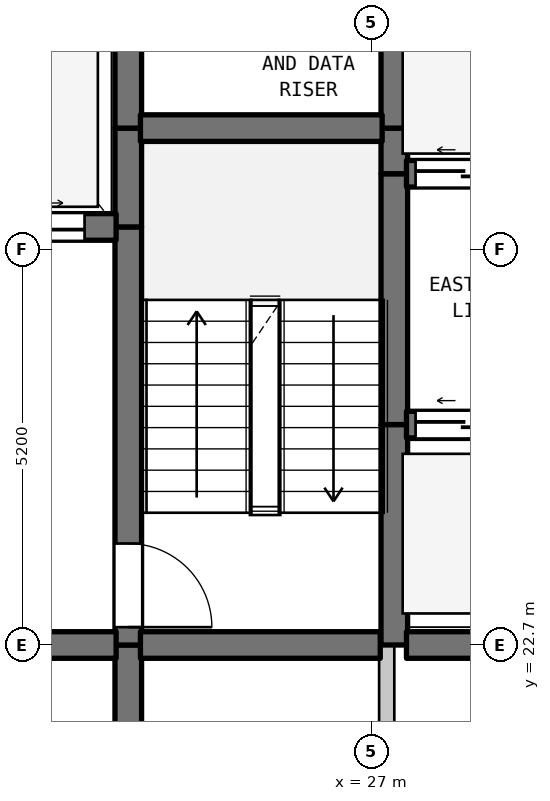
"""IFC4 building model, lengths in metres.
Left out: names, types, materials, properties, quantities, classifications, styles, units other than length and angle.
Written with IfcOpenShell. Run it as: python <this file> out.ifc"""

import sys

from ifc_helpers import new_model, si_unit, direction, frame, frame_2d, origin, place, context, subcontext, project, spatial, rectangle, extrude, element, fill, save


model = new_model("IFC4")
c1 = context("Model", 3, precision=1e-05, world=origin(), true_north=direction((0.0, 1.0)))
c2 = subcontext(c1, "Body", "Model", "MODEL_VIEW")
j1 = project(units=[si_unit("LENGTHUNIT", "METRE"), si_unit("PLANEANGLEUNIT", "RADIAN")], contexts=[c1])
p1 = place(None, origin())
s1 = spatial("IfcSite", under=j1, at=p1, CompositionType="ELEMENT")
p2 = place(p1, origin())
s2 = spatial("IfcBuilding", under=s1, at=p2, CompositionType="ELEMENT")
p3 = place(p2, frame((0.0, 0.0, 42.5)))
s3 = spatial("IfcBuildingStorey", under=s2, at=p3, CompositionType="ELEMENT", Elevation=42.5)
p4 = place(p3, frame((23.8, 19.5, 0.0), z_axis=(0.0, 0.0, 1.0), x_axis=(0.0, 1.0, 0.0)))
e1 = element("IfcWall", 1, at=p4, inside=s3, PredefinedType="SHEAR", context=c2, shape_type="SweptSolid", body=[
    extrude(rectangle(XDim=3.2, YDim=0.35, at=frame_2d((1.6, 0.0))), origin(), (0.0, 0.0, 1.0), 3.385),
])
p5 = place(p3, frame((23.8, 22.7, 0.0), z_axis=(0.0, 0.0, 1.0), x_axis=(0.0, 1.0, 0.0)))
e2 = element("IfcWall", 2, at=p5, inside=s3, PredefinedType="SHEAR", context=c2, shape_type="SweptSolid", body=[
    extrude(rectangle(XDim=5.5, YDim=0.35, at=frame_2d((2.75, 0.0))), origin(), (0.0, 0.0, 1.0), 3.385),
])
p6 = place(p5, frame((0.235, 0.0, 0.0)))
e3 = element("IfcOpeningElement", 3, at=p6, cuts=e2, PredefinedType="OPENING", context=c2, shape_type="SweptSolid", body=[
    extrude(rectangle(XDim=1.1, YDim=2.15, at=frame_2d((0.55, 1.075))), frame((0.0, 0.185, 0.0), z_axis=(0.0, -1.0, 0.0), x_axis=(1.0, 0.0, 0.0)), (0.0, 0.0, 1.0), 0.37),
])
for number, where, z_axis, x_axis in (
    (4, (23.8, 28.2, 0.0), (0.0, 0.0, 1.0), (0.0, 1.0, 0.0)),
    (5, (23.8, 29.5, 0.0), (0.0, 0.0, 1.0), (0.0, 1.0, 0.0)),
):
    element("IfcWall", number, at=place(p3, frame(where, z_axis=z_axis, x_axis=x_axis)), inside=s3, PredefinedType="SHEAR", context=c2, shape_type="SweptSolid", body=[
        extrude(rectangle(XDim=1.3, YDim=0.35, at=frame_2d((0.65, 0.0))), origin(), (0.0, 0.0, 1.0), 3.385),
    ])
p7 = place(p3, frame((27.2, 21.1, 0.0), z_axis=(0.0, 0.0, 1.0), x_axis=(0.0, 1.0, 0.0)))
e6 = element("IfcWall", 6, at=p7, inside=s3, PredefinedType="STANDARD", context=c2, shape_type="SweptSolid", body=[
    extrude(rectangle(XDim=1.6, YDim=0.2, at=frame_2d((0.8, 0.0))), origin(), (0.0, 0.0, 1.0), 3.385),
])
p8 = place(p3, frame((27.3, 22.7, 0.0), z_axis=(0.0, 0.0, 1.0), x_axis=(0.0, 1.0, 0.0)))
e7 = element("IfcWall", 7, at=p8, inside=s3, PredefinedType="SHEAR", context=c2, shape_type="SweptSolid", body=[
    extrude(rectangle(XDim=2.9, YDim=0.35, at=frame_2d((1.45, 0.0))), origin(), (0.0, 0.0, 1.0), 3.385),
])
p9 = place(p3, frame((27.3, 25.6, 0.0), z_axis=(0.0, 0.0, 1.0), x_axis=(0.0, 1.0, 0.0)))
e8 = element("IfcWall", 8, at=p9, inside=s3, PredefinedType="SHEAR", context=c2, shape_type="SweptSolid", body=[
    extrude(rectangle(XDim=3.3, YDim=0.35, at=frame_2d((1.65, 0.0))), origin(), (0.0, 0.0, 1.0), 3.385),
])
p10 = place(p3, frame((27.3, 28.9, 0.0), z_axis=(0.0, 0.0, 1.0), x_axis=(0.0, 1.0, 0.0)))
e9 = element("IfcWall", 9, at=p10, inside=s3, PredefinedType="SHEAR", context=c2, shape_type="SweptSolid", body=[
    extrude(rectangle(XDim=0.6, YDim=0.35, at=frame_2d((0.3, 0.0))), origin(), (0.0, 0.0, 1.0), 3.385),
])
p11 = place(p3, frame((27.3, 29.5, 0.0), z_axis=(0.0, 0.0, 1.0), x_axis=(0.0, 1.0, 0.0)))
e10 = element("IfcWall", 10, at=p11, inside=s3, PredefinedType="SHEAR", context=c2, shape_type="SweptSolid", body=[
    extrude(rectangle(XDim=2.0, YDim=0.35, at=frame_2d((1.0, 0.0))), origin(), (0.0, 0.0, 1.0), 3.385),
])
p12 = place(p3, frame((19.16, 22.7, 0.0), z_axis=(0.0, 0.0, 1.0), x_axis=(1.0, 0.0, 0.0)))
e11 = element("IfcWall", 11, at=p12, inside=s3, PredefinedType="SHEAR", context=c2, shape_type="SweptSolid", body=[
    extrude(rectangle(XDim=4.48, YDim=0.35, at=frame_2d((2.24, 0.0))), origin(), (0.0, 0.0, 1.0), 3.385),
])
p13 = place(p12, frame((1.64, 0.0, 0.0)))
e12 = element("IfcOpeningElement", 12, at=p13, cuts=e11, PredefinedType="OPENING", context=c2, shape_type="SweptSolid", body=[
    extrude(rectangle(XDim=1.2, YDim=2.2, at=frame_2d((0.6, 1.1))), frame((0.0, 0.185, 0.0), z_axis=(0.0, -1.0, 0.0), x_axis=(1.0, 0.0, 0.0)), (0.0, 0.0, 1.0), 0.37),
])
p14 = place(p3, frame((23.96, 22.7, 0.0), z_axis=(0.0, 0.0, 1.0), x_axis=(1.0, 0.0, 0.0)))
e13 = element("IfcWall", 13, at=p14, inside=s3, PredefinedType="SHEAR", context=c2, shape_type="SweptSolid", body=[
    extrude(rectangle(XDim=3.155, YDim=0.35, at=frame_2d((1.578, 0.0))), origin(), (0.0, 0.0, 1.0), 3.385),
])
p15 = place(p3, frame((27.46, 22.7, 0.0), z_axis=(0.0, 0.0, 1.0), x_axis=(1.0, 0.0, 0.0)))
e14 = element("IfcWall", 14, at=p15, inside=s3, PredefinedType="SHEAR", context=c2, shape_type="SweptSolid", body=[
    extrude(rectangle(XDim=3.18, YDim=0.35, at=frame_2d((1.59, 0.0))), origin(), (0.0, 0.0, 1.0), 3.385),
])
p16 = place(p3, frame((27.46, 25.6, 0.0), z_axis=(0.0, 0.0, 1.0), x_axis=(1.0, 0.0, 0.0)))
e15 = element("IfcWall", 15, at=p16, inside=s3, PredefinedType="SHEAR", context=c2, shape_type="SweptSolid", body=[
    extrude(rectangle(XDim=3.18, YDim=0.35, at=frame_2d((1.59, 0.0))), origin(), (0.0, 0.0, 1.0), 3.385),
])
p17 = place(p16, frame((0.12, 0.0, 0.0)))
e16 = element("IfcOpeningElement", 16, at=p17, cuts=e15, PredefinedType="OPENING", context=c2, shape_type="SweptSolid", body=[
    extrude(rectangle(XDim=1.25, YDim=2.2, at=frame_2d((0.625, 1.1))), frame((0.0, 0.185, 0.0), z_axis=(0.0, -1.0, 0.0), x_axis=(1.0, 0.0, 0.0)), (0.0, 0.0, 1.0), 0.37),
])
p18 = place(p16, frame((1.81, 0.0, 0.0)))
e17 = element("IfcOpeningElement", 17, at=p18, cuts=e15, PredefinedType="OPENING", context=c2, shape_type="SweptSolid", body=[
    extrude(rectangle(XDim=1.25, YDim=2.2, at=frame_2d((0.625, 1.1))), frame((0.0, 0.185, 0.0), z_axis=(0.0, -1.0, 0.0), x_axis=(1.0, 0.0, 0.0)), (0.0, 0.0, 1.0), 0.37),
])
p19 = place(p3, frame((19.16, 28.2, 0.0), z_axis=(0.0, 0.0, 1.0), x_axis=(1.0, 0.0, 0.0)))
e18 = element("IfcWall", 18, at=p19, inside=s3, PredefinedType="SHEAR", context=c2, shape_type="SweptSolid", body=[
    extrude(rectangle(XDim=4.48, YDim=0.35, at=frame_2d((2.24, 0.0))), origin(), (0.0, 0.0, 1.0), 3.385),
])
p20 = place(p19, frame((0.415, 0.0, 0.0)))
e19 = element("IfcOpeningElement", 19, at=p20, cuts=e18, PredefinedType="OPENING", context=c2, shape_type="SweptSolid", body=[
    extrude(rectangle(XDim=1.25, YDim=2.2, at=frame_2d((0.625, 1.1))), frame((0.0, 0.185, 0.0), z_axis=(0.0, -1.0, 0.0), x_axis=(1.0, 0.0, 0.0)), (0.0, 0.0, 1.0), 0.37),
])
p21 = place(p19, frame((2.815, 0.0, 0.0)))
e20 = element("IfcOpeningElement", 20, at=p21, cuts=e18, PredefinedType="OPENING", context=c2, shape_type="SweptSolid", body=[
    extrude(rectangle(XDim=1.25, YDim=2.2, at=frame_2d((0.625, 1.1))), frame((0.0, 0.185, 0.0), z_axis=(0.0, -1.0, 0.0), x_axis=(1.0, 0.0, 0.0)), (0.0, 0.0, 1.0), 0.37),
])
p22 = place(p3, frame((27.46, 28.9, 0.0), z_axis=(0.0, 0.0, 1.0), x_axis=(1.0, 0.0, 0.0)))
e21 = element("IfcWall", 21, at=p22, inside=s3, PredefinedType="SHEAR", context=c2, shape_type="SweptSolid", body=[
    extrude(rectangle(XDim=3.18, YDim=0.35, at=frame_2d((1.59, 0.0))), origin(), (0.0, 0.0, 1.0), 3.385),
])
p23 = place(p22, frame((0.12, 0.0, 0.0)))
e22 = element("IfcOpeningElement", 22, at=p23, cuts=e21, PredefinedType="OPENING", context=c2, shape_type="SweptSolid", body=[
    extrude(rectangle(XDim=1.25, YDim=2.2, at=frame_2d((0.625, 1.1))), frame((0.0, 0.185, 0.0), z_axis=(0.0, -1.0, 0.0), x_axis=(1.0, 0.0, 0.0)), (0.0, 0.0, 1.0), 0.37),
])
p24 = place(p22, frame((1.81, 0.0, 0.0)))
e23 = element("IfcOpeningElement", 23, at=p24, cuts=e21, PredefinedType="OPENING", context=c2, shape_type="SweptSolid", body=[
    extrude(rectangle(XDim=1.25, YDim=2.2, at=frame_2d((0.625, 1.1))), frame((0.0, 0.185, 0.0), z_axis=(0.0, -1.0, 0.0), x_axis=(1.0, 0.0, 0.0)), (0.0, 0.0, 1.0), 0.37),
])
p25 = place(p3, frame((23.96, 29.5, 0.0), z_axis=(0.0, 0.0, 1.0), x_axis=(1.0, 0.0, 0.0)))
e24 = element("IfcWall", 24, at=p25, inside=s3, PredefinedType="SHEAR", context=c2, shape_type="SweptSolid", body=[
    extrude(rectangle(XDim=3.18, YDim=0.35, at=frame_2d((1.59, 0.0))), origin(), (0.0, 0.0, 1.0), 3.385),
])
p26 = place(p6, frame((1.1, 0.0, 0.0), z_axis=(0.0, 0.0, 1.0), x_axis=(-1.0, 0.0, 0.0)))
e25 = element("IfcDoor", 25, at=p26, inside=s3, OperationType="SINGLE_SWING_LEFT", PredefinedType="DOOR", context=c2, shape_type="SweptSolid", body=[
    extrude(rectangle(XDim=1.1, YDim=2.15, at=frame_2d((0.55, 1.075))), frame((0.0, 0.025, 0.0), z_axis=(0.0, -1.0, 0.0), x_axis=(1.0, 0.0, 0.0)), (0.0, 0.0, 1.0), 0.05),
])
fill(e3, e25)
p27 = place(p17, origin())
e26 = element("IfcDoor", 26, at=p27, inside=s3, OperationType="DOUBLE_DOOR_SLIDING", PredefinedType="DOOR", context=c2, shape_type="SweptSolid", body=[
    extrude(rectangle(XDim=1.25, YDim=2.2, at=frame_2d((0.625, 1.1))), frame((0.0, 0.025, 0.0), z_axis=(0.0, -1.0, 0.0), x_axis=(1.0, 0.0, 0.0)), (0.0, 0.0, 1.0), 0.05),
])
fill(e16, e26)
p28 = place(p21, origin())
e27 = element("IfcDoor", 27, at=p28, inside=s3, OperationType="DOUBLE_DOOR_SLIDING", PredefinedType="DOOR", context=c2, shape_type="SweptSolid", body=[
    extrude(rectangle(XDim=1.25, YDim=2.2, at=frame_2d((0.625, 1.1))), frame((0.0, 0.025, 0.0), z_axis=(0.0, -1.0, 0.0), x_axis=(1.0, 0.0, 0.0)), (0.0, 0.0, 1.0), 0.05),
])
fill(e20, e27)
p29 = place(p23, origin())
e28 = element("IfcDoor", 28, at=p29, inside=s3, OperationType="DOUBLE_DOOR_SLIDING", PredefinedType="DOOR", context=c2, shape_type="SweptSolid", body=[
    extrude(rectangle(XDim=1.25, YDim=2.2, at=frame_2d((0.625, 1.1))), frame((0.0, 0.025, 0.0), z_axis=(0.0, -1.0, 0.0), x_axis=(1.0, 0.0, 0.0)), (0.0, 0.0, 1.0), 0.05),
])
fill(e22, e28)
save(model, sys.argv[1])
